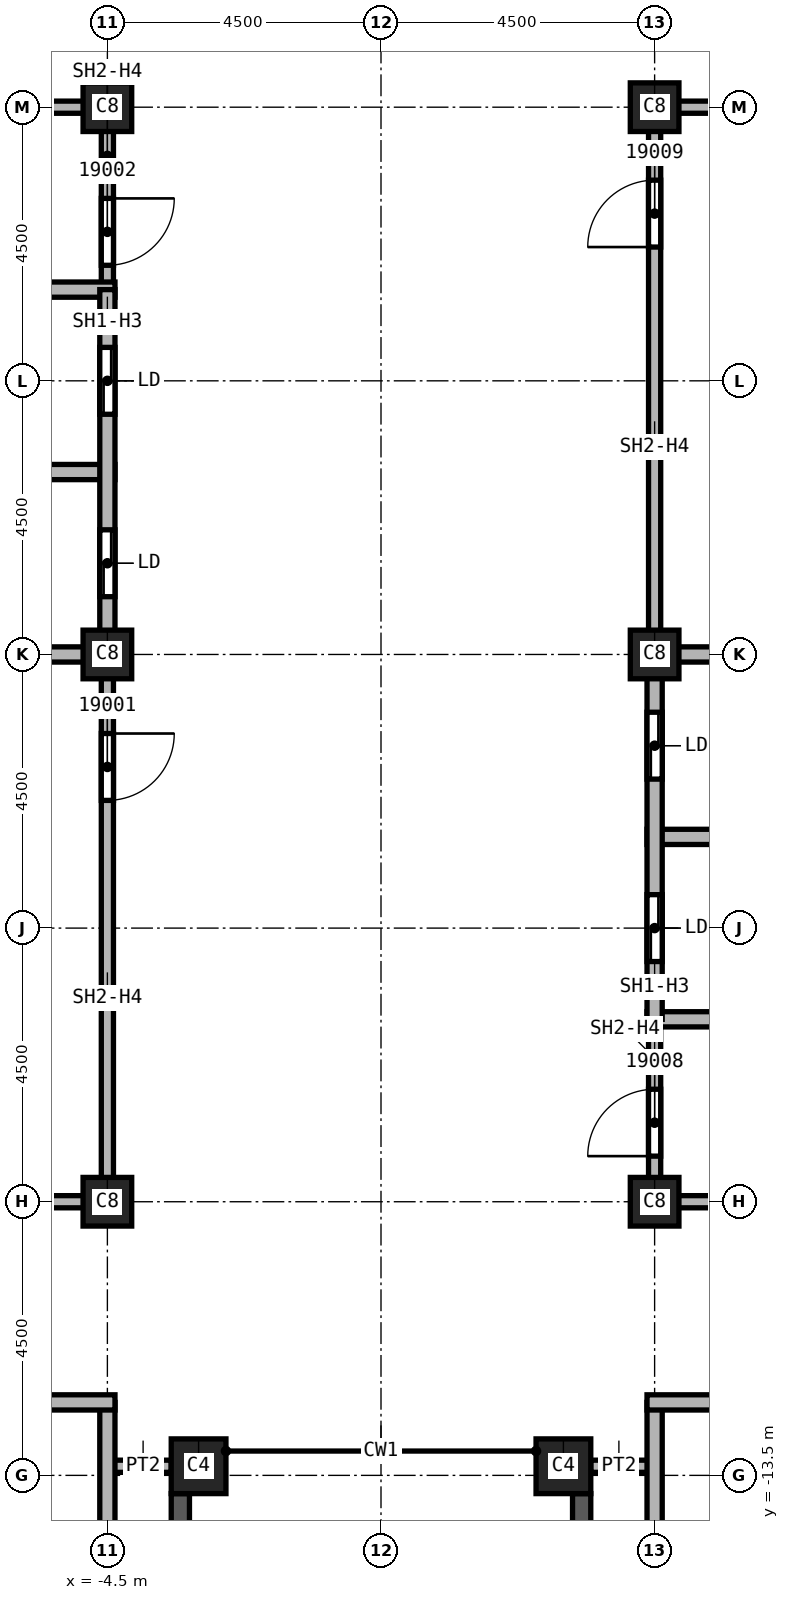
"""IFC4 building model, lengths in metres.
Left out: names, types, materials, properties, quantities, classifications, styles, units other than length and angle.
Written with IfcOpenShell. Run it as: python <this file> out.ifc"""

import sys

from ifc_helpers import new_model, si_unit, direction, frame, frame_2d, origin, origin_2d, place, context, subcontext, project, spatial, rectangle, extrude, element, fill, save


model = new_model("IFC4")
c1 = context("Model", 3, precision=1e-05, world=origin(), true_north=direction((0.0, 1.0)))
c2 = subcontext(c1, "Body", "Model", "MODEL_VIEW")
j1 = project(units=[si_unit("LENGTHUNIT", "METRE"), si_unit("PLANEANGLEUNIT", "RADIAN")], contexts=[c1])
p1 = place(None, origin())
s1 = spatial("IfcSite", under=j1, at=p1, CompositionType="ELEMENT")
p2 = place(p1, origin())
s2 = spatial("IfcBuilding", under=s1, at=p2, CompositionType="ELEMENT")
p3 = place(p2, frame((0.0, 0.0, 282.0)))
s3 = spatial("IfcBuildingStorey", under=s2, at=p3, CompositionType="ELEMENT", Elevation=282.0)
for number, where, z_axis, x_axis in (
    (1, (4.5, 0.0, 0.0), (0.0, 0.0, 1.0), (1.0, 0.0, 0.0)),
    (2, (4.5, 9.0, 0.0), (0.0, 0.0, 1.0), (1.0, 0.0, 0.0)),
    (3, (4.5, -9.0, 0.0), (0.0, 0.0, 1.0), (1.0, 0.0, 0.0)),
    (4, (-4.5, 0.0, 0.0), (0.0, 0.0, 1.0), (1.0, 0.0, 0.0)),
    (5, (-4.5, 9.0, 0.0), (0.0, 0.0, 1.0), (1.0, 0.0, 0.0)),
    (6, (-4.5, -9.0, 0.0), (0.0, 0.0, 1.0), (1.0, 0.0, 0.0)),
):
    element("IfcColumn", number, at=place(p3, frame(where, z_axis=z_axis, x_axis=x_axis)), inside=s3, PredefinedType="COLUMN", context=c2, shape_type="SweptSolid", body=[
        extrude(rectangle(XDim=0.8, YDim=0.8, at=origin_2d()), origin(), (0.0, 0.0, 1.0), 3.72),
    ])
for number, where, z_axis, x_axis in (
    (7, (3.0, -13.35, 0.0), (0.0, 0.0, 1.0), (1.0, 0.0, 0.0)),
    (8, (-3.0, -13.35, 0.0), (0.0, 0.0, 1.0), (1.0, 0.0, 0.0)),
):
    element("IfcColumn", number, at=place(p3, frame(where, z_axis=z_axis, x_axis=x_axis)), inside=s3, PredefinedType="COLUMN", context=c2, shape_type="SweptSolid", body=[
        extrude(rectangle(XDim=0.9, YDim=0.9, at=origin_2d()), origin(), (0.0, 0.0, 1.0), 3.72),
    ])
p4 = place(p3, frame((-3.3, -21.9, 0.0), z_axis=(0.0, 0.0, 1.0), x_axis=(0.0, 1.0, 0.0)))
e9 = element("IfcWall", 9, at=p4, inside=s3, PredefinedType="SOLIDWALL", context=c2, shape_type="SweptSolid", body=[
    extrude(rectangle(XDim=8.1, YDim=0.3, at=frame_2d((4.05, 0.0))), origin(), (0.0, 0.0, 1.0), 3.12),
])
p5 = place(p4, frame((0.825, 0.0, 0.8)))
e10 = element("IfcOpeningElement", 10, at=p5, cuts=e9, PredefinedType="OPENING", context=c2, shape_type="SweptSolid", body=[
    extrude(rectangle(XDim=2.4, YDim=1.95, at=frame_2d((1.2, 0.975))), frame((0.0, 0.15, 0.0), z_axis=(0.0, -1.0, 0.0), x_axis=(1.0, 0.0, 0.0)), (0.0, 0.0, 1.0), 0.3),
])
p6 = place(p4, frame((4.875, 0.0, 0.8)))
e11 = element("IfcOpeningElement", 11, at=p6, cuts=e9, PredefinedType="OPENING", context=c2, shape_type="SweptSolid", body=[
    extrude(rectangle(XDim=2.4, YDim=1.95, at=frame_2d((1.2, 0.975))), frame((0.0, 0.15, 0.0), z_axis=(0.0, -1.0, 0.0), x_axis=(1.0, 0.0, 0.0)), (0.0, 0.0, 1.0), 0.3),
])
p7 = place(p3, frame((3.3, -13.8, 0.0), z_axis=(0.0, 0.0, 1.0), x_axis=(0.0, -1.0, 0.0)))
e12 = element("IfcWall", 12, at=p7, inside=s3, PredefinedType="SOLIDWALL", context=c2, shape_type="SweptSolid", body=[
    extrude(rectangle(XDim=8.1, YDim=0.3, at=frame_2d((4.05, 0.0))), origin(), (0.0, 0.0, 1.0), 3.12),
])
p8 = place(p7, frame((0.825, 0.0, 0.8)))
e13 = element("IfcOpeningElement", 13, at=p8, cuts=e12, PredefinedType="OPENING", context=c2, shape_type="SweptSolid", body=[
    extrude(rectangle(XDim=2.4, YDim=1.95, at=frame_2d((1.2, 0.975))), frame((0.0, 0.15, 0.0), z_axis=(0.0, -1.0, 0.0), x_axis=(1.0, 0.0, 0.0)), (0.0, 0.0, 1.0), 0.3),
])
p9 = place(p7, frame((4.875, 0.0, 0.8)))
e14 = element("IfcOpeningElement", 14, at=p9, cuts=e12, PredefinedType="OPENING", context=c2, shape_type="SweptSolid", body=[
    extrude(rectangle(XDim=2.4, YDim=1.95, at=frame_2d((1.2, 0.975))), frame((0.0, 0.15, 0.0), z_axis=(0.0, -1.0, 0.0), x_axis=(1.0, 0.0, 0.0)), (0.0, 0.0, 1.0), 0.3),
])
for number, where, z_axis, x_axis in (
    (15, (-3.45, -13.35, 0.0), (0.0, 0.0, 1.0), (-1.0, 0.0, 0.0)),
    (16, (4.5, -13.35, 0.0), (0.0, 0.0, 1.0), (-1.0, 0.0, 0.0)),
):
    element("IfcWall", number, at=place(p3, frame(where, z_axis=z_axis, x_axis=x_axis)), inside=s3, PredefinedType="PARTITIONING", context=c2, shape_type="SweptSolid", body=[
        extrude(rectangle(XDim=1.05, YDim=0.2, at=frame_2d((0.525, 0.0))), origin(), (0.0, 0.0, 1.0), 3.72),
    ])
for number, where, z_axis, x_axis in (
    (17, (-7.5, 9.0, 0.0), (0.0, 0.0, 1.0), (1.0, 0.0, 0.0)),
    (18, (-4.5, -9.0, 0.0), (0.0, 0.0, 1.0), (-1.0, 0.0, 0.0)),
):
    element("IfcWall", number, at=place(p3, frame(where, z_axis=z_axis, x_axis=x_axis)), inside=s3, PredefinedType="SOLIDWALL", context=c2, shape_type="SweptSolid", body=[
        extrude(rectangle(XDim=3.0, YDim=0.2, at=frame_2d((1.5, 0.0))), origin(), (0.0, 0.0, 1.0), 3.042),
    ])
p10 = place(p3, frame((-4.5, 0.0, 0.0), z_axis=(0.0, 0.0, 1.0), x_axis=(0.0, -1.0, 0.0)))
e19 = element("IfcWall", 19, at=p10, inside=s3, PredefinedType="SOLIDWALL", context=c2, shape_type="SweptSolid", body=[
    extrude(rectangle(XDim=9.1, YDim=0.2, at=frame_2d((4.55, 0.0))), origin(), (0.0, 0.0, 1.0), 3.042),
])
p11 = place(p10, frame((1.3, 0.0, 0.0)))
e20 = element("IfcOpeningElement", 20, at=p11, cuts=e19, PredefinedType="OPENING", context=c2, shape_type="SweptSolid", body=[
    extrude(rectangle(XDim=1.1, YDim=2.1, at=frame_2d((0.55, 1.05))), frame((0.0, 0.1, 0.0), z_axis=(0.0, -1.0, 0.0), x_axis=(1.0, 0.0, 0.0)), (0.0, 0.0, 1.0), 0.2),
])
p12 = place(p3, frame((-4.5, 9.1, 0.0), z_axis=(0.0, 0.0, 1.0), x_axis=(0.0, -1.0, 0.0)))
e21 = element("IfcWall", 21, at=p12, inside=s3, PredefinedType="SOLIDWALL", context=c2, shape_type="SweptSolid", body=[
    extrude(rectangle(XDim=3.1, YDim=0.2, at=frame_2d((1.55, 0.0))), origin(), (0.0, 0.0, 1.0), 3.042),
])
p13 = place(p12, frame((1.6, 0.0, 0.0)))
e22 = element("IfcOpeningElement", 22, at=p13, cuts=e21, PredefinedType="OPENING", context=c2, shape_type="SweptSolid", body=[
    extrude(rectangle(XDim=1.1, YDim=2.1, at=frame_2d((0.55, 1.05))), frame((0.0, 0.1, 0.0), z_axis=(0.0, -1.0, 0.0), x_axis=(1.0, 0.0, 0.0)), (0.0, 0.0, 1.0), 0.2),
])
p14 = place(p3, frame((4.5, -9.1, 0.0), z_axis=(0.0, 0.0, 1.0), x_axis=(0.0, 1.0, 0.0)))
e23 = element("IfcWall", 23, at=p14, inside=s3, PredefinedType="SOLIDWALL", context=c2, shape_type="SweptSolid", body=[
    extrude(rectangle(XDim=3.1, YDim=0.2, at=frame_2d((1.55, 0.0))), origin(), (0.0, 0.0, 1.0), 3.042),
])
p15 = place(p14, frame((0.85, 0.0, 0.0)))
e24 = element("IfcOpeningElement", 24, at=p15, cuts=e23, PredefinedType="OPENING", context=c2, shape_type="SweptSolid", body=[
    extrude(rectangle(XDim=1.1, YDim=2.1, at=frame_2d((0.55, 1.05))), frame((0.0, 0.1, 0.0), z_axis=(0.0, -1.0, 0.0), x_axis=(1.0, 0.0, 0.0)), (0.0, 0.0, 1.0), 0.2),
])
p16 = place(p3, frame((4.5, 0.0, 0.0), z_axis=(0.0, 0.0, 1.0), x_axis=(0.0, 1.0, 0.0)))
e25 = element("IfcWall", 25, at=p16, inside=s3, PredefinedType="SOLIDWALL", context=c2, shape_type="SweptSolid", body=[
    extrude(rectangle(XDim=9.1, YDim=0.2, at=frame_2d((4.55, 0.0))), origin(), (0.0, 0.0, 1.0), 3.042),
])
p17 = place(p16, frame((6.7, 0.0, 0.0)))
e26 = element("IfcOpeningElement", 26, at=p17, cuts=e25, PredefinedType="OPENING", context=c2, shape_type="SweptSolid", body=[
    extrude(rectangle(XDim=1.1, YDim=2.1, at=frame_2d((0.55, 1.05))), frame((0.0, 0.1, 0.0), z_axis=(0.0, -1.0, 0.0), x_axis=(1.0, 0.0, 0.0)), (0.0, 0.0, 1.0), 0.2),
])
for number, where, z_axis, x_axis in (
    (27, (4.5, 9.0, 0.0), (0.0, 0.0, 1.0), (1.0, 0.0, 0.0)),
    (28, (7.5, -9.0, 0.0), (0.0, 0.0, 1.0), (-1.0, 0.0, 0.0)),
):
    element("IfcWall", number, at=place(p3, frame(where, z_axis=z_axis, x_axis=x_axis)), inside=s3, PredefinedType="SOLIDWALL", context=c2, shape_type="SweptSolid", body=[
        extrude(rectangle(XDim=3.0, YDim=0.2, at=frame_2d((1.5, 0.0))), origin(), (0.0, 0.0, 1.0), 3.042),
    ])
p18 = place(p3, frame((-13.625, 3.0, 0.0), z_axis=(0.0, 0.0, 1.0), x_axis=(1.0, 0.0, 0.0)))
e29 = element("IfcWall", 29, at=p18, inside=s3, PredefinedType="SOLIDWALL", context=c2, shape_type="SweptSolid", body=[
    extrude(rectangle(XDim=9.25, YDim=0.25, at=frame_2d((4.625, 0.0))), origin(), (0.0, 0.0, 1.0), 3.72),
])
p19 = place(p18, frame((3.25, 0.0, 0.0)))
e30 = element("IfcOpeningElement", 30, at=p19, cuts=e29, PredefinedType="OPENING", context=c2, shape_type="SweptSolid", body=[
    extrude(rectangle(XDim=1.1, YDim=2.1, at=frame_2d((0.55, 1.05))), frame((0.0, 0.125, 0.0), z_axis=(0.0, -1.0, 0.0), x_axis=(1.0, 0.0, 0.0)), (0.0, 0.0, 1.0), 0.25),
])
for number, where, z_axis, x_axis in (
    (31, (-7.625, 0.0, 0.0), (0.0, 0.0, 1.0), (1.0, 0.0, 0.0)),
    (32, (-7.625, 6.0, 0.0), (0.0, 0.0, 1.0), (1.0, 0.0, 0.0)),
):
    element("IfcWall", number, at=place(p3, frame(where, z_axis=z_axis, x_axis=x_axis)), inside=s3, PredefinedType="SOLIDWALL", context=c2, shape_type="SweptSolid", body=[
        extrude(rectangle(XDim=3.25, YDim=0.25, at=frame_2d((1.625, 0.0))), origin(), (0.0, 0.0, 1.0), 3.72),
    ])
p20 = place(p3, frame((-4.5, 6.0, 0.0), z_axis=(0.0, 0.0, 1.0), x_axis=(0.0, -1.0, 0.0)))
e33 = element("IfcWall", 33, at=p20, inside=s3, PredefinedType="SOLIDWALL", context=c2, shape_type="SweptSolid", body=[
    extrude(rectangle(XDim=6.0, YDim=0.25, at=frame_2d((3.0, 0.0))), origin(), (0.0, 0.0, 1.0), 3.042),
])
p21 = place(p20, frame((3.95, 0.0, 0.0)))
e34 = element("IfcOpeningElement", 34, at=p21, cuts=e33, PredefinedType="OPENING", context=c2, shape_type="SweptSolid", body=[
    extrude(rectangle(XDim=1.1, YDim=2.1, at=frame_2d((0.55, 1.05))), frame((0.0, 0.125, 0.0), z_axis=(0.0, -1.0, 0.0), x_axis=(1.0, 0.0, 0.0)), (0.0, 0.0, 1.0), 0.25),
])
p22 = place(p20, frame((0.95, 0.0, 0.0)))
e35 = element("IfcOpeningElement", 35, at=p22, cuts=e33, PredefinedType="OPENING", context=c2, shape_type="SweptSolid", body=[
    extrude(rectangle(XDim=1.1, YDim=2.1, at=frame_2d((0.55, 1.05))), frame((0.0, 0.125, 0.0), z_axis=(0.0, -1.0, 0.0), x_axis=(1.0, 0.0, 0.0)), (0.0, 0.0, 1.0), 0.25),
])
p23 = place(p3, frame((4.375, -6.0, 0.0), z_axis=(0.0, 0.0, 1.0), x_axis=(1.0, 0.0, 0.0)))
e36 = element("IfcWall", 36, at=p23, inside=s3, PredefinedType="SOLIDWALL", context=c2, shape_type="SweptSolid", body=[
    extrude(rectangle(XDim=3.25, YDim=0.25, at=frame_2d((1.625, 0.0))), origin(), (0.0, 0.0, 1.0), 3.72),
])
p24 = place(p3, frame((4.375, -3.0, 0.0), z_axis=(0.0, 0.0, 1.0), x_axis=(1.0, 0.0, 0.0)))
e37 = element("IfcWall", 37, at=p24, inside=s3, PredefinedType="SOLIDWALL", context=c2, shape_type="SweptSolid", body=[
    extrude(rectangle(XDim=9.25, YDim=0.25, at=frame_2d((4.625, 0.0))), origin(), (0.0, 0.0, 1.0), 3.72),
])
p25 = place(p24, frame((4.875, 0.0, 0.0)))
e38 = element("IfcOpeningElement", 38, at=p25, cuts=e37, PredefinedType="OPENING", context=c2, shape_type="SweptSolid", body=[
    extrude(rectangle(XDim=1.1, YDim=2.1, at=frame_2d((0.55, 1.05))), frame((0.0, 0.125, 0.0), z_axis=(0.0, -1.0, 0.0), x_axis=(1.0, 0.0, 0.0)), (0.0, 0.0, 1.0), 0.25),
])
p26 = place(p3, frame((4.375, 0.0, 0.0), z_axis=(0.0, 0.0, 1.0), x_axis=(1.0, 0.0, 0.0)))
e39 = element("IfcWall", 39, at=p26, inside=s3, PredefinedType="SOLIDWALL", context=c2, shape_type="SweptSolid", body=[
    extrude(rectangle(XDim=3.25, YDim=0.25, at=frame_2d((1.625, 0.0))), origin(), (0.0, 0.0, 1.0), 3.72),
])
p27 = place(p3, frame((4.5, -6.0, 0.0), z_axis=(0.0, 0.0, 1.0), x_axis=(0.0, 1.0, 0.0)))
e40 = element("IfcWall", 40, at=p27, inside=s3, PredefinedType="SOLIDWALL", context=c2, shape_type="SweptSolid", body=[
    extrude(rectangle(XDim=6.0, YDim=0.25, at=frame_2d((3.0, 0.0))), origin(), (0.0, 0.0, 1.0), 3.042),
])
p28 = place(p27, frame((0.95, 0.0, 0.0)))
e41 = element("IfcOpeningElement", 41, at=p28, cuts=e40, PredefinedType="OPENING", context=c2, shape_type="SweptSolid", body=[
    extrude(rectangle(XDim=1.1, YDim=2.1, at=frame_2d((0.55, 1.05))), frame((0.0, 0.125, 0.0), z_axis=(0.0, -1.0, 0.0), x_axis=(1.0, 0.0, 0.0)), (0.0, 0.0, 1.0), 0.25),
])
p29 = place(p27, frame((3.95, 0.0, 0.0)))
e42 = element("IfcOpeningElement", 42, at=p29, cuts=e40, PredefinedType="OPENING", context=c2, shape_type="SweptSolid", body=[
    extrude(rectangle(XDim=1.1, YDim=2.1, at=frame_2d((0.55, 1.05))), frame((0.0, 0.125, 0.0), z_axis=(0.0, -1.0, 0.0), x_axis=(1.0, 0.0, 0.0)), (0.0, 0.0, 1.0), 0.25),
])
p30 = place(p3, frame((-4.5, -12.3, 0.0), z_axis=(0.0, 0.0, 1.0), x_axis=(0.0, -1.0, 0.0)))
e43 = element("IfcWall", 43, at=p30, inside=s3, PredefinedType="SOLIDWALL", context=c2, shape_type="SweptSolid", body=[
    extrude(rectangle(XDim=4.625, YDim=0.25, at=frame_2d((2.312, 0.0))), origin(), (0.0, 0.0, 1.0), 3.72),
])
p31 = place(p3, frame((-4.375, -12.3, 0.0), z_axis=(0.0, 0.0, 1.0), x_axis=(-1.0, 0.0, 0.0)))
e44 = element("IfcWall", 44, at=p31, inside=s3, PredefinedType="SOLIDWALL", context=c2, shape_type="SweptSolid", body=[
    extrude(rectangle(XDim=9.125, YDim=0.25, at=frame_2d((4.562, 0.0))), origin(), (0.0, 0.0, 1.0), 3.72),
])
p32 = place(p31, frame((7.2, 0.0, 0.0)))
e45 = element("IfcOpeningElement", 45, at=p32, cuts=e44, PredefinedType="OPENING", context=c2, shape_type="SweptSolid", body=[
    extrude(rectangle(XDim=1.2, YDim=2.1, at=frame_2d((0.6, 1.05))), frame((0.0, 0.125, 0.0), z_axis=(0.0, -1.0, 0.0), x_axis=(1.0, 0.0, 0.0)), (0.0, 0.0, 1.0), 0.25),
])
p33 = place(p3, frame((4.5, -16.8, 0.0), z_axis=(0.0, 0.0, 1.0), x_axis=(0.0, 1.0, 0.0)))
e46 = element("IfcWall", 46, at=p33, inside=s3, PredefinedType="SOLIDWALL", context=c2, shape_type="SweptSolid", body=[
    extrude(rectangle(XDim=4.5, YDim=0.25, at=frame_2d((2.25, 0.0))), origin(), (0.0, 0.0, 1.0), 3.72),
])
p34 = place(p3, frame((13.5, -12.3, 0.0), z_axis=(0.0, 0.0, 1.0), x_axis=(-1.0, 0.0, 0.0)))
e47 = element("IfcWall", 47, at=p34, inside=s3, PredefinedType="SOLIDWALL", context=c2, shape_type="SweptSolid", body=[
    extrude(rectangle(XDim=9.125, YDim=0.25, at=frame_2d((4.562, 0.0))), origin(), (0.0, 0.0, 1.0), 3.72),
])
p35 = place(p34, frame((0.6, 0.0, 0.0)))
e48 = element("IfcOpeningElement", 48, at=p35, cuts=e47, PredefinedType="OPENING", context=c2, shape_type="SweptSolid", body=[
    extrude(rectangle(XDim=1.2, YDim=2.1, at=frame_2d((0.6, 1.05))), frame((0.0, 0.125, 0.0), z_axis=(0.0, -1.0, 0.0), x_axis=(1.0, 0.0, 0.0)), (0.0, 0.0, 1.0), 0.25),
])
p36 = place(p11, origin())
e49 = element("IfcDoor", 49, at=p36, inside=s3, OperationType="SINGLE_SWING_RIGHT", PredefinedType="DOOR", context=c2, shape_type="SweptSolid", body=[
    extrude(rectangle(XDim=1.1, YDim=2.1, at=frame_2d((0.55, 1.05))), frame((0.0, 0.025, 0.0), z_axis=(0.0, -1.0, 0.0), x_axis=(1.0, 0.0, 0.0)), (0.0, 0.0, 1.0), 0.05),
])
fill(e20, e49)
p37 = place(p13, origin())
e50 = element("IfcDoor", 50, at=p37, inside=s3, OperationType="SINGLE_SWING_LEFT", PredefinedType="DOOR", context=c2, shape_type="SweptSolid", body=[
    extrude(rectangle(XDim=1.1, YDim=2.1, at=frame_2d((0.55, 1.05))), frame((0.0, 0.025, 0.0), z_axis=(0.0, -1.0, 0.0), x_axis=(1.0, 0.0, 0.0)), (0.0, 0.0, 1.0), 0.05),
])
fill(e22, e50)
p38 = place(p15, origin())
e51 = element("IfcDoor", 51, at=p38, inside=s3, OperationType="SINGLE_SWING_LEFT", PredefinedType="DOOR", context=c2, shape_type="SweptSolid", body=[
    extrude(rectangle(XDim=1.1, YDim=2.1, at=frame_2d((0.55, 1.05))), frame((0.0, 0.025, 0.0), z_axis=(0.0, -1.0, 0.0), x_axis=(1.0, 0.0, 0.0)), (0.0, 0.0, 1.0), 0.05),
])
fill(e24, e51)
p39 = place(p17, origin())
e52 = element("IfcDoor", 52, at=p39, inside=s3, OperationType="SINGLE_SWING_RIGHT", PredefinedType="DOOR", context=c2, shape_type="SweptSolid", body=[
    extrude(rectangle(XDim=1.1, YDim=2.1, at=frame_2d((0.55, 1.05))), frame((0.0, 0.025, 0.0), z_axis=(0.0, -1.0, 0.0), x_axis=(1.0, 0.0, 0.0)), (0.0, 0.0, 1.0), 0.05),
])
fill(e26, e52)
p40 = place(p21, origin())
e53 = element("IfcDoor", 53, at=p40, inside=s3, OperationType="SLIDING_TO_LEFT", PredefinedType="DOOR", context=c2, shape_type="SweptSolid", body=[
    extrude(rectangle(XDim=1.1, YDim=2.1, at=frame_2d((0.55, 1.05))), frame((0.0, 0.025, 0.0), z_axis=(0.0, -1.0, 0.0), x_axis=(1.0, 0.0, 0.0)), (0.0, 0.0, 1.0), 0.05),
])
fill(e34, e53)
p41 = place(p22, origin())
e54 = element("IfcDoor", 54, at=p41, inside=s3, OperationType="SLIDING_TO_LEFT", PredefinedType="DOOR", context=c2, shape_type="SweptSolid", body=[
    extrude(rectangle(XDim=1.1, YDim=2.1, at=frame_2d((0.55, 1.05))), frame((0.0, 0.025, 0.0), z_axis=(0.0, -1.0, 0.0), x_axis=(1.0, 0.0, 0.0)), (0.0, 0.0, 1.0), 0.05),
])
fill(e35, e54)
p42 = place(p28, origin())
e55 = element("IfcDoor", 55, at=p42, inside=s3, OperationType="SLIDING_TO_LEFT", PredefinedType="DOOR", context=c2, shape_type="SweptSolid", body=[
    extrude(rectangle(XDim=1.1, YDim=2.1, at=frame_2d((0.55, 1.05))), frame((0.0, 0.025, 0.0), z_axis=(0.0, -1.0, 0.0), x_axis=(1.0, 0.0, 0.0)), (0.0, 0.0, 1.0), 0.05),
])
fill(e41, e55)
p43 = place(p29, origin())
e56 = element("IfcDoor", 56, at=p43, inside=s3, OperationType="SLIDING_TO_LEFT", PredefinedType="DOOR", context=c2, shape_type="SweptSolid", body=[
    extrude(rectangle(XDim=1.1, YDim=2.1, at=frame_2d((0.55, 1.05))), frame((0.0, 0.025, 0.0), z_axis=(0.0, -1.0, 0.0), x_axis=(1.0, 0.0, 0.0)), (0.0, 0.0, 1.0), 0.05),
])
fill(e42, e56)
save(model, sys.argv[1])
